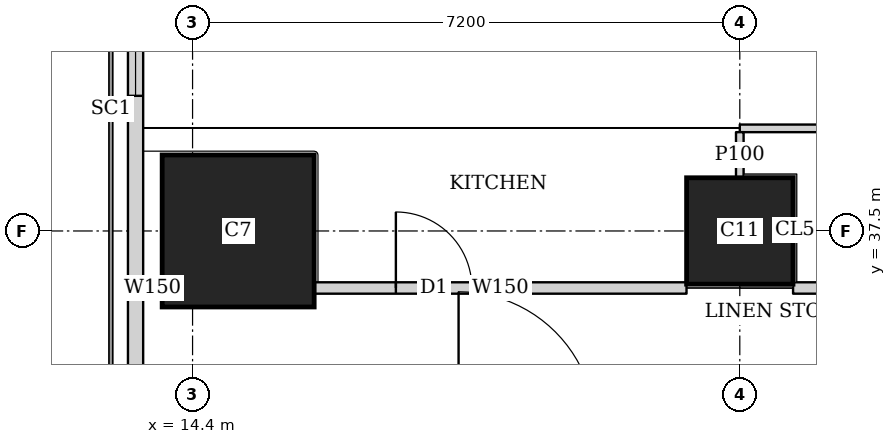
"""IFC4 building model, lengths in metres.
Left out: names, types, materials, properties, quantities, classifications, styles, units other than length and angle.
Written with IfcOpenShell. Run it as: python <this file> out.ifc"""

import sys

from ifc_helpers import new_model, si_unit, direction, frame, frame_2d, origin, origin_2d, place, context, subcontext, project, spatial, rectangle, extrude, element, fill, save


model = new_model("IFC4")
c1 = context("Model", 3, precision=1e-05, world=origin(), true_north=direction((0.0, 1.0)))
c2 = subcontext(c1, "Body", "Model", "MODEL_VIEW")
j1 = project(units=[si_unit("LENGTHUNIT", "METRE"), si_unit("PLANEANGLEUNIT", "RADIAN")], contexts=[c1])
p1 = place(None, origin())
s1 = spatial("IfcSite", under=j1, at=p1, CompositionType="ELEMENT")
p2 = place(p1, origin())
s2 = spatial("IfcBuilding", under=s1, at=p2, CompositionType="ELEMENT")
p3 = place(p2, frame((0.0, 0.0, 266.6)))
s3 = spatial("IfcBuildingStorey", under=s2, at=p3, CompositionType="ELEMENT", Elevation=266.6)
p4 = place(p3, frame((15.0, 37.5, 0.0), z_axis=(0.0, 0.0, 1.0), x_axis=(1.0, 0.0, 0.0)))
e1 = element("IfcColumn", 1, at=p4, inside=s3, PredefinedType="COLUMN", context=c2, shape_type="SweptSolid", body=[
    extrude(rectangle(XDim=2.0, YDim=2.0, at=origin_2d()), origin(), (0.0, 0.0, 1.0), 3.75),
])
p5 = place(p3, frame((21.6, 37.5, 0.0), z_axis=(0.0, 0.0, 1.0), x_axis=(1.0, 0.0, 0.0)))
e2 = element("IfcColumn", 2, at=p5, inside=s3, PredefinedType="COLUMN", context=c2, shape_type="SweptSolid", body=[
    extrude(rectangle(XDim=1.4, YDim=1.4, at=origin_2d()), origin(), (0.0, 0.0, 1.0), 3.75),
])
p6 = place(p3, frame((13.65, 43.037, 0.0), z_axis=(0.0, 0.0, 1.0), x_axis=(0.0, -1.0, 0.0)))
e3 = element("IfcWall", 3, at=p6, inside=s3, PredefinedType="SOLIDWALL", context=c2, shape_type="SweptSolid", body=[
    extrude(rectangle(XDim=35.374, YDim=0.2, at=frame_2d((17.687, 0.0))), origin(), (0.0, 0.0, 1.0), 3.5),
])
p7 = place(p6, frame((1.959, 0.0, 0.9)))
e4 = element("IfcOpeningElement", 4, at=p7, cuts=e3, PredefinedType="OPENING", context=c2, shape_type="SweptSolid", body=[
    extrude(rectangle(XDim=1.8, YDim=1.5, at=frame_2d((0.9, 0.75))), frame((0.0, 0.11, 0.0), z_axis=(0.0, -1.0, 0.0), x_axis=(1.0, 0.0, 0.0)), (0.0, 0.0, 1.0), 0.22),
])
p8 = place(p3, frame((13.75, 36.75, 0.0), z_axis=(0.0, 0.0, 1.0), x_axis=(1.0, 0.0, 0.0)))
e5 = element("IfcWall", 5, at=p8, inside=s3, PredefinedType="SOLIDWALL", context=c2, shape_type="SweptSolid", body=[
    extrude(rectangle(XDim=0.249, YDim=0.15, at=frame_2d((0.125, 0.0))), origin(), (0.0, 0.0, 1.0), 3.5),
])
p9 = place(p3, frame((16.001, 36.75, 0.0), z_axis=(0.0, 0.0, 1.0), x_axis=(1.0, 0.0, 0.0)))
e6 = element("IfcWall", 6, at=p9, inside=s3, PredefinedType="SOLIDWALL", context=c2, shape_type="SweptSolid", body=[
    extrude(rectangle(XDim=4.898, YDim=0.15, at=frame_2d((2.449, 0.0))), origin(), (0.0, 0.0, 1.0), 3.5),
])
p10 = place(p9, frame((1.074, 0.0, 0.0)))
e7 = element("IfcOpeningElement", 7, at=p10, cuts=e6, PredefinedType="OPENING", context=c2, shape_type="SweptSolid", body=[
    extrude(rectangle(XDim=1.0, YDim=2.1, at=frame_2d((0.5, 1.05))), frame((0.0, 0.085, 0.0), z_axis=(0.0, -1.0, 0.0), x_axis=(1.0, 0.0, 0.0)), (0.0, 0.0, 1.0), 0.17),
])
p11 = place(p3, frame((22.301, 36.75, 0.0), z_axis=(0.0, 0.0, 1.0), x_axis=(1.0, 0.0, 0.0)))
e8 = element("IfcWall", 8, at=p11, inside=s3, PredefinedType="SOLIDWALL", context=c2, shape_type="SweptSolid", body=[
    extrude(rectangle(XDim=5.798, YDim=0.15, at=frame_2d((2.899, 0.0))), origin(), (0.0, 0.0, 1.0), 3.5),
])
p12 = place(p3, frame((21.6, 38.85, 0.0), z_axis=(0.0, 0.0, 1.0), x_axis=(1.0, 0.0, 0.0)))
e9 = element("IfcWall", 9, at=p12, inside=s3, PredefinedType="PARTITIONING", context=c2, shape_type="SweptSolid", body=[
    extrude(rectangle(XDim=12.981, YDim=0.1, at=frame_2d((6.49, 0.0))), origin(), (0.0, 0.0, 1.0), 3.5),
])
p13 = place(p12, frame((1.35, 0.0, 0.0)))
e10 = element("IfcOpeningElement", 10, at=p13, cuts=e9, PredefinedType="OPENING", context=c2, shape_type="SweptSolid", body=[
    extrude(rectangle(XDim=0.9, YDim=2.1, at=frame_2d((0.45, 1.05))), frame((0.0, 0.06, 0.0), z_axis=(0.0, -1.0, 0.0), x_axis=(1.0, 0.0, 0.0)), (0.0, 0.0, 1.0), 0.12),
])
p14 = place(p12, frame((5.55, 0.0, 0.0)))
e11 = element("IfcOpeningElement", 11, at=p14, cuts=e9, PredefinedType="OPENING", context=c2, shape_type="SweptSolid", body=[
    extrude(rectangle(XDim=0.9, YDim=2.1, at=frame_2d((0.45, 1.05))), frame((0.0, 0.06, 0.0), z_axis=(0.0, -1.0, 0.0), x_axis=(1.0, 0.0, 0.0)), (0.0, 0.0, 1.0), 0.12),
])
p15 = place(p12, frame((8.55, 0.0, 0.0)))
e12 = element("IfcOpeningElement", 12, at=p15, cuts=e9, PredefinedType="OPENING", context=c2, shape_type="SweptSolid", body=[
    extrude(rectangle(XDim=0.9, YDim=2.1, at=frame_2d((0.45, 1.05))), frame((0.0, 0.06, 0.0), z_axis=(0.0, -1.0, 0.0), x_axis=(1.0, 0.0, 0.0)), (0.0, 0.0, 1.0), 0.12),
])
p16 = place(p12, frame((11.681, 0.0, 0.0)))
e13 = element("IfcOpeningElement", 13, at=p16, cuts=e9, PredefinedType="OPENING", context=c2, shape_type="SweptSolid", body=[
    extrude(rectangle(XDim=0.9, YDim=2.1, at=frame_2d((0.45, 1.05))), frame((0.0, 0.06, 0.0), z_axis=(0.0, -1.0, 0.0), x_axis=(1.0, 0.0, 0.0)), (0.0, 0.0, 1.0), 0.12),
])
p17 = place(p3, frame((21.6, 38.201, 0.0), z_axis=(0.0, 0.0, 1.0), x_axis=(0.0, 1.0, 0.0)))
e14 = element("IfcWall", 14, at=p17, inside=s3, PredefinedType="PARTITIONING", context=c2, shape_type="SweptSolid", body=[
    extrude(rectangle(XDim=0.599, YDim=0.1, at=frame_2d((0.3, 0.0))), origin(), (0.0, 0.0, 1.0), 3.5),
])
p18 = place(p7, origin())
e15 = element("IfcWindow", 15, at=p18, inside=s3, PartitioningType="SINGLE_PANEL", PredefinedType="WINDOW", context=c2, shape_type="SweptSolid", body=[
    extrude(rectangle(XDim=1.8, YDim=1.5, at=frame_2d((0.9, 0.75))), frame((0.0, 0.03, 0.0), z_axis=(0.0, -1.0, 0.0), x_axis=(1.0, 0.0, 0.0)), (0.0, 0.0, 1.0), 0.06),
])
fill(e4, e15)
p19 = place(p10, origin())
e16 = element("IfcDoor", 16, at=p19, inside=s3, OperationType="SINGLE_SWING_LEFT", PredefinedType="DOOR", context=c2, shape_type="SweptSolid", body=[
    extrude(rectangle(XDim=1.0, YDim=2.1, at=frame_2d((0.5, 1.05))), frame((0.0, 0.025, 0.0), z_axis=(0.0, -1.0, 0.0), x_axis=(1.0, 0.0, 0.0)), (0.0, 0.0, 1.0), 0.05),
])
fill(e7, e16)
save(model, sys.argv[1])
